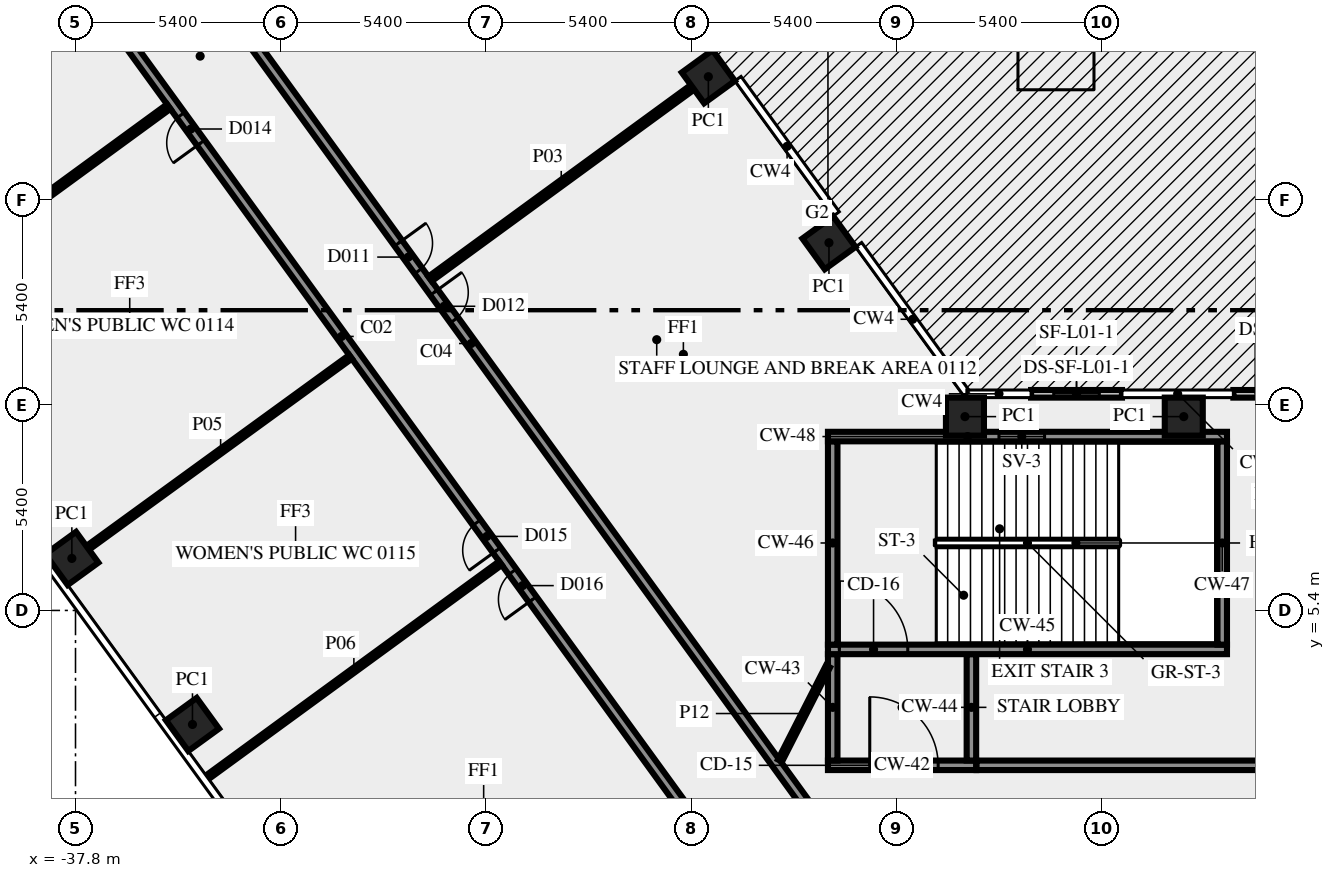
"""IFC4 building model, lengths in metres.
Left out: names, types, materials, properties, quantities, classifications, styles, units other than length and angle.
Written with IfcOpenShell. Run it as: python <this file> out.ifc"""

import sys

from ifc_helpers import new_model, si_unit, direction, frame, frame_2d, origin, origin_2d, place, context, subcontext, project, spatial, rectangle, extrude, element, fill, save


model = new_model("IFC4")
c1 = context("Model", 3, precision=1e-05, world=origin(), true_north=direction((0.0, 1.0)))
c2 = subcontext(c1, "Body", "Model", "MODEL_VIEW")
j1 = project(units=[si_unit("LENGTHUNIT", "METRE"), si_unit("PLANEANGLEUNIT", "RADIAN")], contexts=[c1])
p1 = place(None, origin())
s1 = spatial("IfcSite", under=j1, at=p1, CompositionType="ELEMENT")
p2 = place(p1, origin())
s2 = spatial("IfcBuilding", under=s1, at=p2, CompositionType="ELEMENT")
p3 = place(p2, frame((0.0, 0.0, 6.0)))
s3 = spatial("IfcBuildingStorey", under=s2, at=p3, CompositionType="ELEMENT", Elevation=6.0)
for number, where, z_axis, x_axis in (
    (1, (-17.974, 15.075, 0.0), (0.0, 0.0, 1.0), (-0.588, 0.809, 0.0)),
    (2, (-21.147, 19.444, 0.0), (0.0, 0.0, 1.0), (-0.588, 0.809, 0.0)),
    (3, (-37.896, 6.769, 0.0), (0.0, 0.0, 1.0), (0.588, -0.809, 0.0)),
    (4, (-34.722, 2.4, 0.0), (0.0, 0.0, 1.0), (0.588, -0.809, 0.0)),
    (5, (-8.637, 10.5, 0.0), (0.0, 0.0, 1.0), (-1.0, 0.0, 0.0)),
    (6, (-14.395, 10.5, 0.0), (0.0, 0.0, 1.0), (-1.0, 0.0, 0.0)),
):
    element("IfcColumn", number, at=place(p3, frame(where, z_axis=z_axis, x_axis=x_axis)), inside=s3, PredefinedType="COLUMN", context=c2, shape_type="SweptSolid", body=[
        extrude(rectangle(XDim=1.0, YDim=1.0, at=origin_2d()), origin(), (0.0, 0.0, 1.0), 5.1),
    ])
p4 = place(p3, frame((-7.332, 11.1, 0.0), z_axis=(0.0, 0.0, 1.0), x_axis=(1.0, 0.0, 0.0)))
e7 = element("IfcWall", 7, at=p4, inside=s3, PredefinedType="SOLIDWALL", context=c2, shape_type="SweptSolid", body=[
    extrude(rectangle(XDim=3.189, YDim=0.2, at=frame_2d((1.594, 0.0))), origin(), (0.0, 0.0, 1.0), 5.1),
])
p5 = place(p4, frame((0.594, 0.0, 0.0)))
e8 = element("IfcOpeningElement", 8, at=p5, cuts=e7, PredefinedType="OPENING", context=c2, shape_type="SweptSolid", body=[
    extrude(rectangle(XDim=2.0, YDim=2.4, at=frame_2d((1.0, 1.2))), frame((0.0, 0.11, 0.0), z_axis=(0.0, -1.0, 0.0), x_axis=(1.0, 0.0, 0.0)), (0.0, 0.0, 1.0), 0.22),
])
p6 = place(p3, frame((-10.263, 11.1, 0.0), z_axis=(0.0, 0.0, 1.0), x_axis=(-1.0, 0.0, 0.0)))
e9 = element("IfcWall", 9, at=p6, inside=s3, PredefinedType="SOLIDWALL", context=c2, shape_type="SweptSolid", body=[
    extrude(rectangle(XDim=2.392, YDim=0.2, at=frame_2d((1.196, 0.0))), origin(), (0.0, 0.0, 1.0), 5.1),
])
p7 = place(p6, frame((0.596, 0.0, 1.0)))
e10 = element("IfcOpeningElement", 10, at=p7, cuts=e9, PredefinedType="OPENING", context=c2, shape_type="SweptSolid", body=[
    extrude(rectangle(XDim=1.2, YDim=1.2, at=frame_2d((0.6, 0.6))), frame((0.0, 0.11, 0.0), z_axis=(0.0, -1.0, 0.0), x_axis=(1.0, 0.0, 0.0)), (0.0, 0.0, 1.0), 0.22),
])
p8 = place(p3, frame((-18.0, 1.325, 0.0), z_axis=(0.0, 0.0, 1.0), x_axis=(1.0, 0.0, 0.0)))
e11 = element("IfcWall", 11, at=p8, inside=s3, PredefinedType="SHEAR", context=c2, shape_type="SweptSolid", body=[
    extrude(rectangle(XDim=3.9, YDim=0.25, at=frame_2d((1.95, 0.0))), origin(), (0.0, 0.0, 1.0), 5.1),
])
p9 = place(p8, frame((1.1, 0.0, 0.0)))
e12 = element("IfcOpeningElement", 12, at=p9, cuts=e11, PredefinedType="OPENING", context=c2, shape_type="SweptSolid", body=[
    extrude(rectangle(XDim=1.8, YDim=2.1, at=frame_2d((0.9, 1.05))), frame((0.0, 0.135, 0.0), z_axis=(0.0, -1.0, 0.0), x_axis=(1.0, 0.0, 0.0)), (0.0, 0.0, 1.0), 0.27),
])
for number, where, z_axis, x_axis in (
    (13, (-17.875, 1.45, 0.0), (0.0, 0.0, 1.0), (0.0, 1.0, 0.0)),
    (14, (-14.225, 1.45, 0.0), (0.0, 0.0, 1.0), (0.0, 1.0, 0.0)),
):
    element("IfcWall", number, at=place(p3, frame(where, z_axis=z_axis, x_axis=x_axis)), inside=s3, PredefinedType="SHEAR", context=c2, shape_type="SweptSolid", body=[
        extrude(rectangle(XDim=2.8, YDim=0.25, at=frame_2d((1.4, 0.0))), origin(), (0.0, 0.0, 1.0), 5.1),
    ])
p10 = place(p3, frame((-18.0, 4.375, 0.0), z_axis=(0.0, 0.0, 1.0), x_axis=(1.0, 0.0, 0.0)))
e15 = element("IfcWall", 15, at=p10, inside=s3, PredefinedType="SHEAR", context=c2, shape_type="SweptSolid", body=[
    extrude(rectangle(XDim=10.5, YDim=0.25, at=frame_2d((5.25, 0.0))), origin(), (0.0, 0.0, 1.0), 5.1),
])
p11 = place(p10, frame((0.3, 0.0, 0.0)))
e16 = element("IfcOpeningElement", 16, at=p11, cuts=e15, PredefinedType="OPENING", context=c2, shape_type="SweptSolid", body=[
    extrude(rectangle(XDim=1.8, YDim=2.1, at=frame_2d((0.9, 1.05))), frame((0.0, 0.135, 0.0), z_axis=(0.0, -1.0, 0.0), x_axis=(1.0, 0.0, 0.0)), (0.0, 0.0, 1.0), 0.27),
])
for number, where, z_axis, x_axis in (
    (17, (-17.875, 4.5, 0.0), (0.0, 0.0, 1.0), (0.0, 1.0, 0.0)),
    (18, (-7.625, 4.5, 0.0), (0.0, 0.0, 1.0), (0.0, 1.0, 0.0)),
):
    element("IfcWall", number, at=place(p3, frame(where, z_axis=z_axis, x_axis=x_axis)), inside=s3, PredefinedType="SHEAR", context=c2, shape_type="SweptSolid", body=[
        extrude(rectangle(XDim=5.35, YDim=0.25, at=frame_2d((2.675, 0.0))), origin(), (0.0, 0.0, 1.0), 5.1),
    ])
p12 = place(p3, frame((-18.0, 9.975, 0.0), z_axis=(0.0, 0.0, 1.0), x_axis=(1.0, 0.0, 0.0)))
e19 = element("IfcWall", 19, at=p12, inside=s3, PredefinedType="SHEAR", context=c2, shape_type="SweptSolid", body=[
    extrude(rectangle(XDim=10.5, YDim=0.25, at=frame_2d((5.25, 0.0))), origin(), (0.0, 0.0, 1.0), 5.1),
])
p13 = place(p12, frame((4.5, 0.0, 1.0)))
e20 = element("IfcOpeningElement", 20, at=p13, cuts=e19, PredefinedType="OPENING", context=c2, shape_type="SweptSolid", body=[
    extrude(rectangle(XDim=1.2, YDim=1.2, at=frame_2d((0.6, 0.6))), frame((0.0, 0.135, 0.0), z_axis=(0.0, -1.0, 0.0), x_axis=(1.0, 0.0, 0.0)), (0.0, 0.0, 1.0), 0.27),
])
p14 = place(p3, frame((-20.531, -1.523, 0.0), z_axis=(0.0, 0.0, 1.0), x_axis=(-0.587784522481, 0.809017524614, 0.0)))
e21 = element("IfcWall", 21, at=p14, inside=s3, PredefinedType="SOLIDWALL", context=c2, shape_type="SweptSolid", body=[
    extrude(rectangle(XDim=49.912, YDim=0.25, at=frame_2d((24.956, 0.0))), origin(), (0.0, 0.0, 1.0), 5.1),
])
p15 = place(p14, frame((48.57, 0.0, 0.0)))
e22 = element("IfcOpeningElement", 22, at=p15, cuts=e21, PredefinedType="OPENING", context=c2, shape_type="SweptSolid", body=[
    extrude(rectangle(XDim=0.9, YDim=2.1, at=frame_2d((0.45, 1.05))), frame((0.0, 0.135, 0.0), z_axis=(0.0, -1.0, 0.0), x_axis=(1.0, 0.0, 0.0)), (0.0, 0.0, 1.0), 0.27),
])
p16 = place(p14, frame((10.516, 0.0, 0.0)))
e23 = element("IfcOpeningElement", 23, at=p16, cuts=e21, PredefinedType="OPENING", context=c2, shape_type="SweptSolid", body=[
    extrude(rectangle(XDim=0.9, YDim=2.1, at=frame_2d((0.45, 1.05))), frame((0.0, 0.135, 0.0), z_axis=(0.0, -1.0, 0.0), x_axis=(1.0, 0.0, 0.0)), (0.0, 0.0, 1.0), 0.27),
])
p17 = place(p14, frame((23.766, 0.0, 0.0)))
e24 = element("IfcOpeningElement", 24, at=p17, cuts=e21, PredefinedType="OPENING", context=c2, shape_type="SweptSolid", body=[
    extrude(rectangle(XDim=0.9, YDim=2.1, at=frame_2d((0.45, 1.05))), frame((0.0, 0.135, 0.0), z_axis=(0.0, -1.0, 0.0), x_axis=(1.0, 0.0, 0.0)), (0.0, 0.0, 1.0), 0.27),
])
p18 = place(p14, frame((8.916, 0.0, 0.0)))
e25 = element("IfcOpeningElement", 25, at=p18, cuts=e21, PredefinedType="OPENING", context=c2, shape_type="SweptSolid", body=[
    extrude(rectangle(XDim=0.9, YDim=2.1, at=frame_2d((0.45, 1.05))), frame((0.0, 0.135, 0.0), z_axis=(0.0, -1.0, 0.0), x_axis=(1.0, 0.0, 0.0)), (0.0, 0.0, 1.0), 0.27),
])
p19 = place(p3, frame((-37.232, 25.972, 0.0), z_axis=(0.0, 0.0, 1.0), x_axis=(0.587786323093, -0.809016216391, 0.0)))
e26 = element("IfcWall", 26, at=p19, inside=s3, PredefinedType="SOLIDWALL", context=c2, shape_type="SweptSolid", body=[
    extrude(rectangle(XDim=33.493, YDim=0.25, at=frame_2d((16.747, 0.0))), origin(), (0.0, 0.0, 1.0), 5.1),
])
p20 = place(p19, frame((13.485, 0.0, 0.0)))
e27 = element("IfcOpeningElement", 27, at=p20, cuts=e26, PredefinedType="OPENING", context=c2, shape_type="SweptSolid", body=[
    extrude(rectangle(XDim=0.9, YDim=2.1, at=frame_2d((0.45, 1.05))), frame((0.0, 0.135, 0.0), z_axis=(0.0, -1.0, 0.0), x_axis=(1.0, 0.0, 0.0)), (0.0, 0.0, 1.0), 0.27),
])
p21 = place(p19, frame((15.085, 0.0, 0.0)))
e28 = element("IfcOpeningElement", 28, at=p21, cuts=e26, PredefinedType="OPENING", context=c2, shape_type="SweptSolid", body=[
    extrude(rectangle(XDim=0.9, YDim=2.1, at=frame_2d((0.45, 1.05))), frame((0.0, 0.135, 0.0), z_axis=(0.0, -1.0, 0.0), x_axis=(1.0, 0.0, 0.0)), (0.0, 0.0, 1.0), 0.27),
])
p22 = place(p3, frame((-14.09, 1.325, 0.0), z_axis=(0.0, 0.0, 1.0), x_axis=(1.0, 0.0, 0.0)))
e29 = element("IfcWall", 29, at=p22, inside=s3, PredefinedType="SOLIDWALL", context=c2, shape_type="SweptSolid", body=[
    extrude(rectangle(XDim=28.18, YDim=0.25, at=frame_2d((14.09, 0.0))), origin(), (0.0, 0.0, 1.0), 5.1),
])
p23 = place(p22, frame((13.19, 0.0, 0.0)))
e30 = element("IfcOpeningElement", 30, at=p23, cuts=e29, PredefinedType="OPENING", context=c2, shape_type="SweptSolid", body=[
    extrude(rectangle(XDim=1.8, YDim=2.1, at=frame_2d((0.9, 1.05))), frame((0.0, 0.135, 0.0), z_axis=(0.0, -1.0, 0.0), x_axis=(1.0, 0.0, 0.0)), (0.0, 0.0, 1.0), 0.27),
])
p24 = place(p3, frame((-28.469, 14.124, 0.0), z_axis=(0.0, 0.0, 1.0), x_axis=(0.80760412282, 0.589725004391, 0.0)))
e31 = element("IfcWall", 31, at=p24, inside=s3, PredefinedType="PARTITIONING", context=c2, shape_type="SweptSolid", body=[
    extrude(rectangle(XDim=8.545, YDim=0.15, at=frame_2d((4.272, 0.0))), origin(), (0.0, 0.0, 1.0), 5.1),
])
p25 = place(p3, frame((-43.142, 12.966, 0.0), z_axis=(0.0, 0.0, 1.0), x_axis=(0.807596868297, 0.589734939034, 0.0)))
e32 = element("IfcWall", 32, at=p25, inside=s3, PredefinedType="PARTITIONING", context=c2, shape_type="SweptSolid", body=[
    extrude(rectangle(XDim=9.651, YDim=0.15, at=frame_2d((4.825, 0.0))), origin(), (0.0, 0.0, 1.0), 4.1),
])
p26 = place(p3, frame((-30.563, 12.072, 0.0), z_axis=(0.0, 0.0, 1.0), x_axis=(-0.808992136407, -0.587819464829, 0.0)))
e33 = element("IfcWall", 33, at=p26, inside=s3, PredefinedType="PARTITIONING", context=c2, shape_type="SweptSolid", body=[
    extrude(rectangle(XDim=8.45, YDim=0.12, at=frame_2d((4.225, 0.0))), origin(), (0.0, 0.0, 1.0), 5.1),
])
p27 = place(p3, frame((-34.332, 1.011, 0.0), z_axis=(0.0, 0.0, 1.0), x_axis=(0.807594822539, 0.589737740532, 0.0)))
e34 = element("IfcWall", 34, at=p27, inside=s3, PredefinedType="PARTITIONING", context=c2, shape_type="SweptSolid", body=[
    extrude(rectangle(XDim=9.55, YDim=0.12, at=frame_2d((4.775, 0.0))), origin(), (0.0, 0.0, 1.0), 4.1),
])
p28 = place(p3, frame((-19.261, 1.45, 0.0), z_axis=(0.0, 0.0, 1.0), x_axis=(0.453950796792, 0.891026752736, 0.0)))
e35 = element("IfcWall", 35, at=p28, inside=s3, PredefinedType="PARTITIONING", context=c2, shape_type="SweptSolid", body=[
    extrude(rectangle(XDim=2.778, YDim=0.12, at=frame_2d((1.389, 0.0))), origin(), (0.0, 0.0, 1.0), 5.1),
])
p29 = place(p7, origin())
e36 = element("IfcWindow", 36, at=p29, inside=s3, PartitioningType="SINGLE_PANEL", PredefinedType="WINDOW", context=c2, shape_type="SweptSolid", body=[
    extrude(rectangle(XDim=1.2, YDim=1.2, at=frame_2d((0.6, 0.6))), frame((0.0, 0.03, 0.0), z_axis=(0.0, -1.0, 0.0), x_axis=(1.0, 0.0, 0.0)), (0.0, 0.0, 1.0), 0.06),
])
fill(e10, e36)
p30 = place(p3, frame((0.0, 0.0, -0.4)))
p31 = place(p30, frame((-12.0, 21.0, 0.0)))
p32 = place(p31, frame((0.0, 0.0, 0.35)))
e37 = element("IfcWindow", 37, at=p32, inside=s3, PartitioningType="SINGLE_PANEL", PredefinedType="SKYLIGHT", context=c2, shape_type="SweptSolid", body=[
    extrude(rectangle(XDim=1.2, YDim=3.0, at=origin_2d()), origin(), (0.0, 0.0, 1.0), 0.05),
])
p33 = place(p9, origin())
e38 = element("IfcDoor", 38, at=p33, inside=s3, OperationType="DOUBLE_DOOR_SINGLE_SWING", PredefinedType="DOOR", context=c2, shape_type="SweptSolid", body=[
    extrude(rectangle(XDim=1.8, YDim=2.1, at=frame_2d((0.9, 1.05))), frame((0.0, 0.025, 0.0), z_axis=(0.0, -1.0, 0.0), x_axis=(1.0, 0.0, 0.0)), (0.0, 0.0, 1.0), 0.05),
])
fill(e12, e38)
p34 = place(p11, origin())
e39 = element("IfcDoor", 39, at=p34, inside=s3, OperationType="DOUBLE_DOOR_SINGLE_SWING", PredefinedType="DOOR", context=c2, shape_type="SweptSolid", body=[
    extrude(rectangle(XDim=1.8, YDim=2.1, at=frame_2d((0.9, 1.05))), frame((0.0, 0.025, 0.0), z_axis=(0.0, -1.0, 0.0), x_axis=(1.0, 0.0, 0.0)), (0.0, 0.0, 1.0), 0.05),
])
fill(e16, e39)
p35 = place(p13, origin())
e40 = element("IfcWindow", 40, at=p35, inside=s3, PartitioningType="SINGLE_PANEL", PredefinedType="WINDOW", context=c2, shape_type="SweptSolid", body=[
    extrude(rectangle(XDim=1.2, YDim=1.2, at=frame_2d((0.6, 0.6))), frame((0.0, 0.03, 0.0), z_axis=(0.0, -1.0, 0.0), x_axis=(1.0, 0.0, 0.0)), (0.0, 0.0, 1.0), 0.06),
])
fill(e20, e40)
p36 = place(p20, origin())
e41 = element("IfcDoor", 41, at=p36, inside=s3, OperationType="SINGLE_SWING_RIGHT", PredefinedType="DOOR", context=c2, shape_type="SweptSolid", body=[
    extrude(rectangle(XDim=0.9, YDim=2.1, at=frame_2d((0.45, 1.05))), frame((0.0, 0.025, 0.0), z_axis=(0.0, -1.0, 0.0), x_axis=(1.0, 0.0, 0.0)), (0.0, 0.0, 1.0), 0.05),
])
fill(e27, e41)
p37 = place(p16, origin())
e42 = element("IfcDoor", 42, at=p37, inside=s3, OperationType="SINGLE_SWING_LEFT", PredefinedType="DOOR", context=c2, shape_type="SweptSolid", body=[
    extrude(rectangle(XDim=0.9, YDim=2.1, at=frame_2d((0.45, 1.05))), frame((0.0, 0.025, 0.0), z_axis=(0.0, -1.0, 0.0), x_axis=(1.0, 0.0, 0.0)), (0.0, 0.0, 1.0), 0.05),
])
fill(e23, e42)
p38 = place(p17, origin())
e43 = element("IfcDoor", 43, at=p38, inside=s3, OperationType="SINGLE_SWING_RIGHT", PredefinedType="DOOR", context=c2, shape_type="SweptSolid", body=[
    extrude(rectangle(XDim=0.9, YDim=2.1, at=frame_2d((0.45, 1.05))), frame((0.0, 0.025, 0.0), z_axis=(0.0, -1.0, 0.0), x_axis=(1.0, 0.0, 0.0)), (0.0, 0.0, 1.0), 0.05),
])
fill(e24, e43)
p39 = place(p18, origin())
e44 = element("IfcDoor", 44, at=p39, inside=s3, OperationType="SINGLE_SWING_RIGHT", PredefinedType="DOOR", context=c2, shape_type="SweptSolid", body=[
    extrude(rectangle(XDim=0.9, YDim=2.1, at=frame_2d((0.45, 1.05))), frame((0.0, 0.025, 0.0), z_axis=(0.0, -1.0, 0.0), x_axis=(1.0, 0.0, 0.0)), (0.0, 0.0, 1.0), 0.05),
])
fill(e25, e44)
p40 = place(p21, origin())
e45 = element("IfcDoor", 45, at=p40, inside=s3, OperationType="SINGLE_SWING_LEFT", PredefinedType="DOOR", context=c2, shape_type="SweptSolid", body=[
    extrude(rectangle(XDim=0.9, YDim=2.1, at=frame_2d((0.45, 1.05))), frame((0.0, 0.025, 0.0), z_axis=(0.0, -1.0, 0.0), x_axis=(1.0, 0.0, 0.0)), (0.0, 0.0, 1.0), 0.05),
])
fill(e28, e45)
save(model, sys.argv[1])
